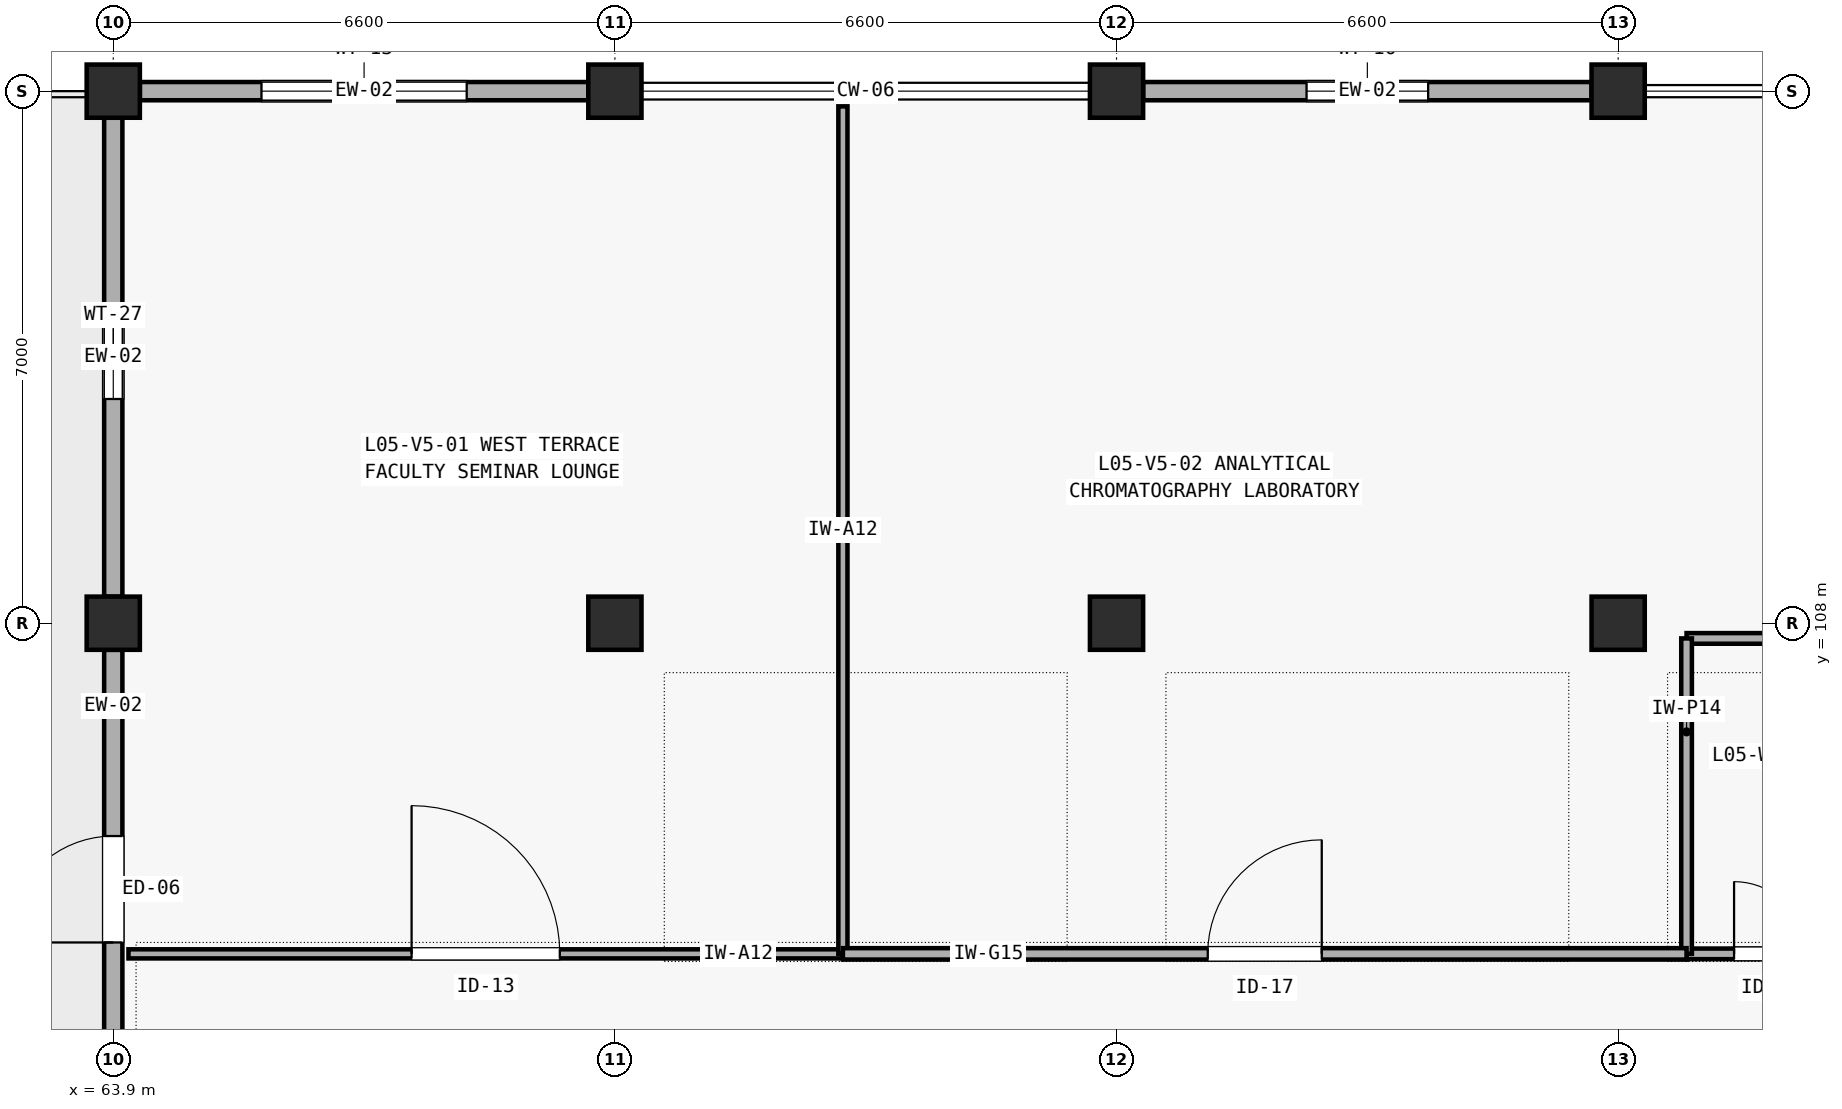
"""IFC4 building model, lengths in metres.
Left out: names, types, materials, properties, quantities, classifications, styles, units other than length and angle.
Written with IfcOpenShell. Run it as: python <this file> out.ifc"""

import sys

from ifc_helpers import new_model, si_unit, direction, frame, frame_2d, origin, origin_2d, place, context, subcontext, project, spatial, rectangle, extrude, element, fill, save


model = new_model("IFC4")
c1 = context("Model", 3, precision=1e-05, world=origin(), true_north=direction((0.0, 1.0)))
c2 = subcontext(c1, "Body", "Model", "MODEL_VIEW")
j1 = project(units=[si_unit("LENGTHUNIT", "METRE"), si_unit("PLANEANGLEUNIT", "RADIAN")], contexts=[c1])
p1 = place(None, origin())
s1 = spatial("IfcSite", under=j1, at=p1, CompositionType="ELEMENT")
p2 = place(p1, origin())
s2 = spatial("IfcBuilding", under=s1, at=p2, CompositionType="ELEMENT")
p3 = place(p2, frame((0.0, 0.0, 21.0)))
s3 = spatial("IfcBuildingStorey", under=s2, at=p3, CompositionType="ELEMENT", Elevation=21.0)
for number, where, z_axis, x_axis in (
    (1, (63.9, 108.0, 0.0), (0.0, 0.0, 1.0), (1.0, 0.0, 0.0)),
    (2, (63.9, 115.0, 0.0), (0.0, 0.0, 1.0), (1.0, 0.0, 0.0)),
    (3, (70.5, 108.0, 0.0), (0.0, 0.0, 1.0), (1.0, 0.0, 0.0)),
    (4, (70.5, 115.0, 0.0), (0.0, 0.0, 1.0), (1.0, 0.0, 0.0)),
    (5, (77.1, 108.0, 0.0), (0.0, 0.0, 1.0), (1.0, 0.0, 0.0)),
    (6, (77.1, 115.0, 0.0), (0.0, 0.0, 1.0), (1.0, 0.0, 0.0)),
    (7, (83.7, 108.0, 0.0), (0.0, 0.0, 1.0), (1.0, 0.0, 0.0)),
    (8, (83.7, 115.0, 0.0), (0.0, 0.0, 1.0), (1.0, 0.0, 0.0)),
):
    element("IfcColumn", number, at=place(p3, frame(where, z_axis=z_axis, x_axis=x_axis)), inside=s3, PredefinedType="COLUMN", context=c2, shape_type="SweptSolid", body=[
        extrude(rectangle(XDim=0.7, YDim=0.7, at=origin_2d()), origin(), (0.0, 0.0, 1.0), 4.2),
    ])
p4 = place(p3, frame((64.25, 115.0, 0.0), z_axis=(0.0, 0.0, 1.0), x_axis=(1.0, 0.0, 0.0)))
e9 = element("IfcWall", 9, at=p4, inside=s3, PredefinedType="SOLIDWALL", context=c2, shape_type="SweptSolid", body=[
    extrude(rectangle(XDim=5.9, YDim=0.24, at=frame_2d((2.95, 0.0))), origin(), (0.0, 0.0, 1.0), 3.385),
])
p5 = place(p4, frame((1.6, 0.0, 0.85)))
e10 = element("IfcOpeningElement", 10, at=p5, cuts=e9, PredefinedType="OPENING", context=c2, shape_type="SweptSolid", body=[
    extrude(rectangle(XDim=2.7, YDim=1.5, at=frame_2d((1.35, 0.75))), frame((0.0, 0.13, 0.0), z_axis=(0.0, -1.0, 0.0), x_axis=(1.0, 0.0, 0.0)), (0.0, 0.0, 1.0), 0.26),
])
p6 = place(p3, frame((77.45, 115.0, 0.0), z_axis=(0.0, 0.0, 1.0), x_axis=(1.0, 0.0, 0.0)))
e11 = element("IfcWall", 11, at=p6, inside=s3, PredefinedType="SOLIDWALL", context=c2, shape_type="SweptSolid", body=[
    extrude(rectangle(XDim=5.9, YDim=0.24, at=frame_2d((2.95, 0.0))), origin(), (0.0, 0.0, 1.0), 3.345),
])
p7 = place(p6, frame((2.15, 0.0, 0.85)))
e12 = element("IfcOpeningElement", 12, at=p7, cuts=e11, PredefinedType="OPENING", context=c2, shape_type="SweptSolid", body=[
    extrude(rectangle(XDim=1.6, YDim=1.25, at=frame_2d((0.8, 0.625))), frame((0.0, 0.13, 0.0), z_axis=(0.0, -1.0, 0.0), x_axis=(1.0, 0.0, 0.0)), (0.0, 0.0, 1.0), 0.26),
])
p8 = place(p3, frame((63.9, 101.35, 0.0), z_axis=(0.0, 0.0, 1.0), x_axis=(0.0, 1.0, 0.0)))
e13 = element("IfcWall", 13, at=p8, inside=s3, PredefinedType="SOLIDWALL", context=c2, shape_type="SweptSolid", body=[
    extrude(rectangle(XDim=6.3, YDim=0.24, at=frame_2d((3.15, 0.0))), origin(), (0.0, 0.0, 1.0), 3.505),
])
p9 = place(p8, frame((2.45, 0.0, 0.0)))
e14 = element("IfcOpeningElement", 14, at=p9, cuts=e13, PredefinedType="OPENING", context=c2, shape_type="SweptSolid", body=[
    extrude(rectangle(XDim=1.4, YDim=2.15, at=frame_2d((0.7, 1.075))), frame((0.0, 0.13, 0.0), z_axis=(0.0, -1.0, 0.0), x_axis=(1.0, 0.0, 0.0)), (0.0, 0.0, 1.0), 0.26),
])
p10 = place(p3, frame((63.9, 108.35, 0.0), z_axis=(0.0, 0.0, 1.0), x_axis=(0.0, 1.0, 0.0)))
e15 = element("IfcWall", 15, at=p10, inside=s3, PredefinedType="SOLIDWALL", context=c2, shape_type="SweptSolid", body=[
    extrude(rectangle(XDim=6.3, YDim=0.24, at=frame_2d((3.15, 0.0))), origin(), (0.0, 0.0, 1.0), 3.505),
])
p11 = place(p10, frame((2.6, 0.0, 0.85)))
e16 = element("IfcOpeningElement", 16, at=p11, cuts=e15, PredefinedType="OPENING", context=c2, shape_type="SweptSolid", body=[
    extrude(rectangle(XDim=1.1, YDim=1.45, at=frame_2d((0.55, 0.725))), frame((0.0, 0.13, 0.0), z_axis=(0.0, -1.0, 0.0), x_axis=(1.0, 0.0, 0.0)), (0.0, 0.0, 1.0), 0.26),
])
p12 = place(p3, frame((84.6, 103.65, 0.0), z_axis=(0.0, 0.0, 1.0), x_axis=(1.0, 0.0, 0.0)))
e17 = element("IfcWall", 17, at=p12, inside=s3, PredefinedType="PLUMBINGWALL", context=c2, shape_type="SweptSolid", body=[
    extrude(rectangle(XDim=2.2, YDim=0.14, at=frame_2d((1.1, 0.0))), origin(), (0.0, 0.0, 1.0), 3.9),
])
p13 = place(p12, frame((0.625, 0.0, 0.0)))
e18 = element("IfcOpeningElement", 18, at=p13, cuts=e17, PredefinedType="OPENING", context=c2, shape_type="SweptSolid", body=[
    extrude(rectangle(XDim=0.95, YDim=2.1, at=frame_2d((0.475, 1.05))), frame((0.0, 0.08, 0.0), z_axis=(0.0, -1.0, 0.0), x_axis=(1.0, 0.0, 0.0)), (0.0, 0.0, 1.0), 0.16),
])
p14 = place(p3, frame((84.6, 107.8, 0.0), z_axis=(0.0, 0.0, 1.0), x_axis=(1.0, 0.0, 0.0)))
e19 = element("IfcWall", 19, at=p14, inside=s3, PredefinedType="PLUMBINGWALL", context=c2, shape_type="SweptSolid", body=[
    extrude(rectangle(XDim=2.2, YDim=0.14, at=frame_2d((1.1, 0.0))), origin(), (0.0, 0.0, 1.0), 3.135),
])
p15 = place(p3, frame((84.6, 103.65, 0.0), z_axis=(0.0, 0.0, 1.0), x_axis=(0.0, 1.0, 0.0)))
e20 = element("IfcWall", 20, at=p15, inside=s3, PredefinedType="PLUMBINGWALL", context=c2, shape_type="SweptSolid", body=[
    extrude(rectangle(XDim=4.15, YDim=0.14, at=frame_2d((2.075, 0.0))), origin(), (0.0, 0.0, 1.0), 3.9),
])
p16 = place(p3, frame((64.1, 103.65, 0.0), z_axis=(0.0, 0.0, 1.0), x_axis=(1.0, 0.0, 0.0)))
e21 = element("IfcWall", 21, at=p16, inside=s3, PredefinedType="PARTITIONING", context=c2, shape_type="SweptSolid", body=[
    extrude(rectangle(XDim=9.4, YDim=0.12, at=frame_2d((4.7, 0.0))), origin(), (0.0, 0.0, 1.0), 3.9),
])
p17 = place(p16, frame((3.725, 0.0, 0.0)))
e22 = element("IfcOpeningElement", 22, at=p17, cuts=e21, PredefinedType="OPENING", context=c2, shape_type="SweptSolid", body=[
    extrude(rectangle(XDim=1.95, YDim=2.3, at=frame_2d((0.975, 1.15))), frame((0.0, 0.07, 0.0), z_axis=(0.0, -1.0, 0.0), x_axis=(1.0, 0.0, 0.0)), (0.0, 0.0, 1.0), 0.14),
])
p18 = place(p3, frame((73.5, 103.65, 0.0), z_axis=(0.0, 0.0, 1.0), x_axis=(0.0, 1.0, 0.0)))
e23 = element("IfcWall", 23, at=p18, inside=s3, PredefinedType="PARTITIONING", context=c2, shape_type="SweptSolid", body=[
    extrude(rectangle(XDim=11.15, YDim=0.12, at=frame_2d((5.575, 0.0))), origin(), (0.0, 0.0, 1.0), 3.9),
])
p19 = place(p3, frame((73.5, 103.65, 0.0), z_axis=(0.0, 0.0, 1.0), x_axis=(1.0, 0.0, 0.0)))
e24 = element("IfcWall", 24, at=p19, inside=s3, PredefinedType="PARTITIONING", context=c2, shape_type="SweptSolid", body=[
    extrude(rectangle(XDim=11.1, YDim=0.15, at=frame_2d((5.55, 0.0))), origin(), (0.0, 0.0, 1.0), 3.9),
])
p20 = place(p19, frame((4.8, 0.0, 0.0)))
e25 = element("IfcOpeningElement", 25, at=p20, cuts=e24, PredefinedType="OPENING", context=c2, shape_type="SweptSolid", body=[
    extrude(rectangle(XDim=1.5, YDim=2.15, at=frame_2d((0.75, 1.075))), frame((0.0, 0.085, 0.0), z_axis=(0.0, -1.0, 0.0), x_axis=(1.0, 0.0, 0.0)), (0.0, 0.0, 1.0), 0.17),
])
p21 = place(p5, origin())
e26 = element("IfcWindow", 26, at=p21, inside=s3, PartitioningType="SINGLE_PANEL", PredefinedType="WINDOW", context=c2, shape_type="SweptSolid", body=[
    extrude(rectangle(XDim=2.7, YDim=1.5, at=frame_2d((1.35, 0.75))), frame((0.0, 0.03, 0.0), z_axis=(0.0, -1.0, 0.0), x_axis=(1.0, 0.0, 0.0)), (0.0, 0.0, 1.0), 0.06),
])
fill(e10, e26)
p22 = place(p7, origin())
e27 = element("IfcWindow", 27, at=p22, inside=s3, PartitioningType="SINGLE_PANEL", PredefinedType="WINDOW", context=c2, shape_type="SweptSolid", body=[
    extrude(rectangle(XDim=1.6, YDim=1.25, at=frame_2d((0.8, 0.625))), frame((0.0, 0.03, 0.0), z_axis=(0.0, -1.0, 0.0), x_axis=(1.0, 0.0, 0.0)), (0.0, 0.0, 1.0), 0.06),
])
fill(e12, e27)
p23 = place(p9, origin())
e28 = element("IfcDoor", 28, at=p23, inside=s3, OperationType="SINGLE_SWING_LEFT", PredefinedType="DOOR", context=c2, shape_type="SweptSolid", body=[
    extrude(rectangle(XDim=1.4, YDim=2.15, at=frame_2d((0.7, 1.075))), frame((0.0, 0.025, 0.0), z_axis=(0.0, -1.0, 0.0), x_axis=(1.0, 0.0, 0.0)), (0.0, 0.0, 1.0), 0.05),
])
fill(e14, e28)
p24 = place(p11, origin())
e29 = element("IfcWindow", 29, at=p24, inside=s3, PartitioningType="SINGLE_PANEL", PredefinedType="WINDOW", context=c2, shape_type="SweptSolid", body=[
    extrude(rectangle(XDim=1.1, YDim=1.45, at=frame_2d((0.55, 0.725))), frame((0.0, 0.03, 0.0), z_axis=(0.0, -1.0, 0.0), x_axis=(1.0, 0.0, 0.0)), (0.0, 0.0, 1.0), 0.06),
])
fill(e16, e29)
p25 = place(p13, origin())
e30 = element("IfcDoor", 30, at=p25, inside=s3, OperationType="SINGLE_SWING_LEFT", PredefinedType="DOOR", context=c2, shape_type="SweptSolid", body=[
    extrude(rectangle(XDim=0.95, YDim=2.1, at=frame_2d((0.475, 1.05))), frame((0.0, 0.025, 0.0), z_axis=(0.0, -1.0, 0.0), x_axis=(1.0, 0.0, 0.0)), (0.0, 0.0, 1.0), 0.05),
])
fill(e18, e30)
p26 = place(p17, origin())
e31 = element("IfcDoor", 31, at=p26, inside=s3, OperationType="SINGLE_SWING_LEFT", PredefinedType="DOOR", context=c2, shape_type="SweptSolid", body=[
    extrude(rectangle(XDim=1.95, YDim=2.3, at=frame_2d((0.975, 1.15))), frame((0.0, 0.025, 0.0), z_axis=(0.0, -1.0, 0.0), x_axis=(1.0, 0.0, 0.0)), (0.0, 0.0, 1.0), 0.05),
])
fill(e22, e31)
p27 = place(p20, origin())
e32 = element("IfcDoor", 32, at=p27, inside=s3, OperationType="SINGLE_SWING_RIGHT", PredefinedType="DOOR", context=c2, shape_type="SweptSolid", body=[
    extrude(rectangle(XDim=1.5, YDim=2.15, at=frame_2d((0.75, 1.075))), frame((0.0, 0.025, 0.0), z_axis=(0.0, -1.0, 0.0), x_axis=(1.0, 0.0, 0.0)), (0.0, 0.0, 1.0), 0.05),
])
fill(e25, e32)
save(model, sys.argv[1])
